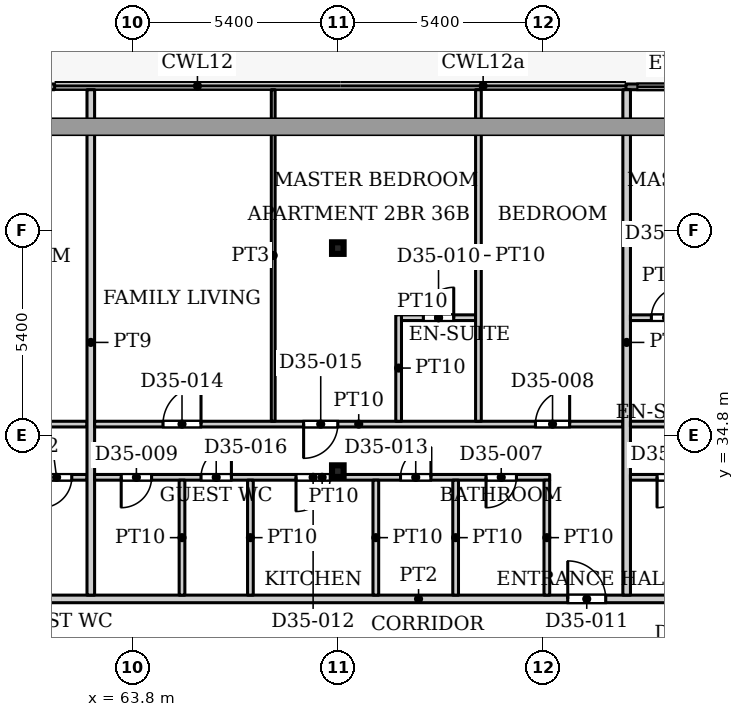
"""IFC4 building model, lengths in metres.
Left out: names, types, materials, properties, quantities, classifications, styles, units other than length and angle.
Written with IfcOpenShell. Run it as: python <this file> out.ifc"""

import sys

from ifc_helpers import new_model, si_unit, direction, frame, frame_2d, origin, origin_2d, place, context, subcontext, project, spatial, rectangle, hollow_rectangle, extrude, source, transform, mapped, element, fill, save


model = new_model("IFC4")
c1 = context("Model", 3, precision=1e-05, world=origin(), true_north=direction((0.0, 1.0)))
c2 = subcontext(c1, "Body", "Model", "MODEL_VIEW")
j1 = project(units=[si_unit("LENGTHUNIT", "METRE"), si_unit("PLANEANGLEUNIT", "RADIAN")], contexts=[c1])
p1 = place(None, origin())
s1 = spatial("IfcSite", under=j1, at=p1, CompositionType="ELEMENT")
p2 = place(p1, origin())
s2 = spatial("IfcBuilding", under=s1, at=p2, CompositionType="ELEMENT")
p3 = place(p2, frame((0.0, 0.0, 156.5)))
s3 = spatial("IfcBuildingStorey", under=s2, at=p3, CompositionType="ELEMENT", Elevation=156.5)
for number, where, z_axis, x_axis in (
    (1, (69.2, 33.863, 0.0), (0.0, 0.0, 1.0), (1.0, 0.0, 0.0)),
    (2, (69.2, 39.732, 0.0), (0.0, 0.0, 1.0), (1.0, 0.0, 0.0)),
):
    element("IfcColumn", number, at=place(p3, frame(where, z_axis=z_axis, x_axis=x_axis)), inside=s3, PredefinedType="COLUMN", context=c2, shape_type="SweptSolid", body=[
        extrude(hollow_rectangle(XDim=0.305, YDim=0.305, WallThickness=0.016, InnerFilletRadius=0.016, OuterFilletRadius=0.032, at=origin_2d()), origin(), (0.0, 0.0, 1.0), 3.9),
    ])
p4 = place(p3, frame((59.347, 43.975, 0.0), z_axis=(0.0, 0.0, 1.0), x_axis=(1.0, 0.0, 0.0)))
e3 = element("IfcWall", 3, at=p4, inside=s3, PredefinedType="SOLIDWALL", context=c2, shape_type="SweptSolid", body=[
    extrude(rectangle(XDim=2.401, YDim=0.15, at=frame_2d((1.201, 0.0))), origin(), (0.0, 0.0, 1.0), 3.75),
])
p5 = place(p4, frame((0.3, 0.0, 0.0)))
e4 = element("IfcOpeningElement", 4, at=p5, cuts=e3, PredefinedType="OPENING", context=c2, shape_type="SweptSolid", body=[
    extrude(rectangle(XDim=1.8, YDim=2.4, at=frame_2d((0.9, 1.2))), frame((0.0, 0.085, 0.0), z_axis=(0.0, -1.0, 0.0), x_axis=(1.0, 0.0, 0.0)), (0.0, 0.0, 1.0), 0.17),
])
p6 = place(p3, frame((76.782, 43.975, 0.0), z_axis=(0.0, 0.0, 1.0), x_axis=(1.0, 0.0, 0.0)))
e5 = element("IfcWall", 5, at=p6, inside=s3, PredefinedType="SOLIDWALL", context=c2, shape_type="SweptSolid", body=[
    extrude(rectangle(XDim=2.4, YDim=0.15, at=frame_2d((1.2, 0.0))), origin(), (0.0, 0.0, 1.0), 3.75),
])
p7 = place(p6, frame((0.3, 0.0, 0.0)))
e6 = element("IfcOpeningElement", 6, at=p7, cuts=e5, PredefinedType="OPENING", context=c2, shape_type="SweptSolid", body=[
    extrude(rectangle(XDim=1.8, YDim=2.4, at=frame_2d((0.9, 1.2))), frame((0.0, 0.085, 0.0), z_axis=(0.0, -1.0, 0.0), x_axis=(1.0, 0.0, 0.0)), (0.0, 0.0, 1.0), 0.17),
])
p8 = place(p3, frame((53.549, 30.5, 0.0), z_axis=(0.0, 0.0, 1.0), x_axis=(1.0, 0.0, 0.0)))
e7 = element("IfcWall", 7, at=p8, inside=s3, PredefinedType="PARTITIONING", context=c2, shape_type="SweptSolid", body=[
    extrude(rectangle(XDim=35.551, YDim=0.2, at=frame_2d((17.775, 0.0))), origin(), (0.0, 0.0, 1.0), 3.6),
])
p9 = place(p8, frame((0.251, 0.0, 0.0)))
e8 = element("IfcOpeningElement", 8, at=p9, cuts=e7, PredefinedType="OPENING", context=c2, shape_type="SweptSolid", body=[
    extrude(rectangle(XDim=1.0, YDim=2.1, at=frame_2d((0.5, 1.05))), frame((0.0, 0.11, 0.0), z_axis=(0.0, -1.0, 0.0), x_axis=(1.0, 0.0, 0.0)), (0.0, 0.0, 1.0), 0.22),
])
p10 = place(p8, frame((21.701, 0.0, 0.0)))
e9 = element("IfcOpeningElement", 9, at=p10, cuts=e7, PredefinedType="OPENING", context=c2, shape_type="SweptSolid", body=[
    extrude(rectangle(XDim=1.0, YDim=2.1, at=frame_2d((0.5, 1.05))), frame((0.0, 0.11, 0.0), z_axis=(0.0, -1.0, 0.0), x_axis=(1.0, 0.0, 0.0)), (0.0, 0.0, 1.0), 0.22),
])
p11 = place(p8, frame((32.201, 0.0, 0.0)))
e10 = element("IfcOpeningElement", 10, at=p11, cuts=e7, PredefinedType="OPENING", context=c2, shape_type="SweptSolid", body=[
    extrude(rectangle(XDim=1.0, YDim=2.1, at=frame_2d((0.5, 1.05))), frame((0.0, 0.11, 0.0), z_axis=(0.0, -1.0, 0.0), x_axis=(1.0, 0.0, 0.0)), (0.0, 0.0, 1.0), 0.22),
])
p12 = place(p3, frame((53.549, 35.1, 0.0), z_axis=(0.0, 0.0, 1.0), x_axis=(1.0, 0.0, 0.0)))
e11 = element("IfcWall", 11, at=p12, inside=s3, PredefinedType="PARTITIONING", context=c2, shape_type="SweptSolid", body=[
    extrude(rectangle(XDim=9.051, YDim=0.15, at=frame_2d((4.525, 0.0))), origin(), (0.0, 0.0, 1.0), 3.6),
])
p13 = place(p12, frame((6.751, 0.0, 0.0)))
e12 = element("IfcOpeningElement", 12, at=p13, cuts=e11, PredefinedType="OPENING", context=c2, shape_type="SweptSolid", body=[
    extrude(rectangle(XDim=0.9, YDim=2.1, at=frame_2d((0.45, 1.05))), frame((0.0, 0.085, 0.0), z_axis=(0.0, -1.0, 0.0), x_axis=(1.0, 0.0, 0.0)), (0.0, 0.0, 1.0), 0.17),
])
p14 = place(p12, frame((2.051, 0.0, 0.0)))
e13 = element("IfcOpeningElement", 13, at=p14, cuts=e11, PredefinedType="OPENING", context=c2, shape_type="SweptSolid", body=[
    extrude(rectangle(XDim=1.0, YDim=2.1, at=frame_2d((0.5, 1.05))), frame((0.0, 0.085, 0.0), z_axis=(0.0, -1.0, 0.0), x_axis=(1.0, 0.0, 0.0)), (0.0, 0.0, 1.0), 0.17),
])
p15 = place(p3, frame((55.125, 33.7, 0.0), z_axis=(0.0, 0.0, 1.0), x_axis=(1.0, 0.0, 0.0)))
e14 = element("IfcWall", 14, at=p15, inside=s3, PredefinedType="PARTITIONING", context=c2, shape_type="SweptSolid", body=[
    extrude(rectangle(XDim=7.475, YDim=0.15, at=frame_2d((3.738, 0.0))), origin(), (0.0, 0.0, 1.0), 3.6),
])
p16 = place(p15, frame((0.875, 0.0, 0.0)))
e15 = element("IfcOpeningElement", 15, at=p16, cuts=e14, PredefinedType="OPENING", context=c2, shape_type="SweptSolid", body=[
    extrude(rectangle(XDim=0.8, YDim=2.1, at=frame_2d((0.4, 1.05))), frame((0.0, 0.085, 0.0), z_axis=(0.0, -1.0, 0.0), x_axis=(1.0, 0.0, 0.0)), (0.0, 0.0, 1.0), 0.17),
])
p17 = place(p15, frame((3.675, 0.0, 0.0)))
e16 = element("IfcOpeningElement", 16, at=p17, cuts=e14, PredefinedType="OPENING", context=c2, shape_type="SweptSolid", body=[
    extrude(rectangle(XDim=0.9, YDim=2.1, at=frame_2d((0.45, 1.05))), frame((0.0, 0.085, 0.0), z_axis=(0.0, -1.0, 0.0), x_axis=(1.0, 0.0, 0.0)), (0.0, 0.0, 1.0), 0.17),
])
p18 = place(p15, frame((6.275, 0.0, 0.0)))
e17 = element("IfcOpeningElement", 17, at=p18, cuts=e14, PredefinedType="OPENING", context=c2, shape_type="SweptSolid", body=[
    extrude(rectangle(XDim=0.8, YDim=2.1, at=frame_2d((0.4, 1.05))), frame((0.0, 0.085, 0.0), z_axis=(0.0, -1.0, 0.0), x_axis=(1.0, 0.0, 0.0)), (0.0, 0.0, 1.0), 0.17),
])
p19 = place(p3, frame((62.7, 30.6, 0.0), z_axis=(0.0, 0.0, 1.0), x_axis=(0.0, 1.0, 0.0)))
e18 = element("IfcWall", 18, at=p19, inside=s3, PredefinedType="PARTITIONING", context=c2, shape_type="SweptSolid", body=[
    extrude(rectangle(XDim=13.3, YDim=0.2, at=frame_2d((6.65, 0.0))), origin(), (0.0, 0.0, 1.0), 3.6),
])
p20 = place(p3, frame((62.8, 33.7, 0.0), z_axis=(0.0, 0.0, 1.0), x_axis=(1.0, 0.0, 0.0)))
e19 = element("IfcWall", 19, at=p20, inside=s3, PredefinedType="PARTITIONING", context=c2, shape_type="SweptSolid", body=[
    extrude(rectangle(XDim=11.975, YDim=0.15, at=frame_2d((5.987, 0.0))), origin(), (0.0, 0.0, 1.0), 3.6),
])
p21 = place(p20, frame((10.3, 0.0, 0.0)))
e20 = element("IfcOpeningElement", 20, at=p21, cuts=e19, PredefinedType="OPENING", context=c2, shape_type="SweptSolid", body=[
    extrude(rectangle(XDim=0.8, YDim=2.1, at=frame_2d((0.4, 1.05))), frame((0.0, 0.085, 0.0), z_axis=(0.0, -1.0, 0.0), x_axis=(1.0, 0.0, 0.0)), (0.0, 0.0, 1.0), 0.17),
])
p22 = place(p20, frame((0.7, 0.0, 0.0)))
e21 = element("IfcOpeningElement", 21, at=p22, cuts=e19, PredefinedType="OPENING", context=c2, shape_type="SweptSolid", body=[
    extrude(rectangle(XDim=0.8, YDim=2.1, at=frame_2d((0.4, 1.05))), frame((0.0, 0.085, 0.0), z_axis=(0.0, -1.0, 0.0), x_axis=(1.0, 0.0, 0.0)), (0.0, 0.0, 1.0), 0.17),
])
p23 = place(p20, frame((5.3, 0.0, 0.0)))
e22 = element("IfcOpeningElement", 22, at=p23, cuts=e19, PredefinedType="OPENING", context=c2, shape_type="SweptSolid", body=[
    extrude(rectangle(XDim=0.9, YDim=2.1, at=frame_2d((0.45, 1.05))), frame((0.0, 0.085, 0.0), z_axis=(0.0, -1.0, 0.0), x_axis=(1.0, 0.0, 0.0)), (0.0, 0.0, 1.0), 0.17),
])
p24 = place(p20, frame((8.05, 0.0, 0.0)))
e23 = element("IfcOpeningElement", 23, at=p24, cuts=e19, PredefinedType="OPENING", context=c2, shape_type="SweptSolid", body=[
    extrude(rectangle(XDim=0.8, YDim=2.1, at=frame_2d((0.4, 1.05))), frame((0.0, 0.085, 0.0), z_axis=(0.0, -1.0, 0.0), x_axis=(1.0, 0.0, 0.0)), (0.0, 0.0, 1.0), 0.17),
])
p25 = place(p20, frame((2.8, 0.0, 0.0)))
e24 = element("IfcOpeningElement", 24, at=p25, cuts=e19, PredefinedType="OPENING", context=c2, shape_type="SweptSolid", body=[
    extrude(rectangle(XDim=0.8, YDim=2.1, at=frame_2d((0.4, 1.05))), frame((0.0, 0.085, 0.0), z_axis=(0.0, -1.0, 0.0), x_axis=(1.0, 0.0, 0.0)), (0.0, 0.0, 1.0), 0.17),
])
p26 = place(p3, frame((62.8, 35.1, 0.0), z_axis=(0.0, 0.0, 1.0), x_axis=(1.0, 0.0, 0.0)))
e25 = element("IfcWall", 25, at=p26, inside=s3, PredefinedType="PARTITIONING", context=c2, shape_type="SweptSolid", body=[
    extrude(rectangle(XDim=13.9, YDim=0.15, at=frame_2d((6.95, 0.0))), origin(), (0.0, 0.0, 1.0), 3.6),
])
p27 = place(p26, frame((11.6, 0.0, 0.0)))
e26 = element("IfcOpeningElement", 26, at=p27, cuts=e25, PredefinedType="OPENING", context=c2, shape_type="SweptSolid", body=[
    extrude(rectangle(XDim=0.9, YDim=2.1, at=frame_2d((0.45, 1.05))), frame((0.0, 0.085, 0.0), z_axis=(0.0, -1.0, 0.0), x_axis=(1.0, 0.0, 0.0)), (0.0, 0.0, 1.0), 0.17),
])
p28 = place(p26, frame((1.8, 0.0, 0.0)))
e27 = element("IfcOpeningElement", 27, at=p28, cuts=e25, PredefinedType="OPENING", context=c2, shape_type="SweptSolid", body=[
    extrude(rectangle(XDim=1.0, YDim=2.1, at=frame_2d((0.5, 1.05))), frame((0.0, 0.085, 0.0), z_axis=(0.0, -1.0, 0.0), x_axis=(1.0, 0.0, 0.0)), (0.0, 0.0, 1.0), 0.17),
])
p29 = place(p26, frame((5.5, 0.0, 0.0)))
e28 = element("IfcOpeningElement", 28, at=p29, cuts=e25, PredefinedType="OPENING", context=c2, shape_type="SweptSolid", body=[
    extrude(rectangle(XDim=0.9, YDim=2.1, at=frame_2d((0.45, 1.05))), frame((0.0, 0.085, 0.0), z_axis=(0.0, -1.0, 0.0), x_axis=(1.0, 0.0, 0.0)), (0.0, 0.0, 1.0), 0.17),
])
for number, where, z_axis, x_axis in (
    (29, (65.1, 30.6, 0.0), (0.0, 0.0, 1.0), (0.0, 1.0, 0.0)),
    (30, (66.9, 30.6, 0.0), (0.0, 0.0, 1.0), (0.0, 1.0, 0.0)),
):
    element("IfcWall", number, at=place(p3, frame(where, z_axis=z_axis, x_axis=x_axis)), inside=s3, PredefinedType="PARTITIONING", context=c2, shape_type="SweptSolid", body=[
        extrude(rectangle(XDim=3.025, YDim=0.15, at=frame_2d((1.512, 0.0))), origin(), (0.0, 0.0, 1.0), 3.6),
    ])
p30 = place(p3, frame((67.5, 35.175, 0.0), z_axis=(0.0, 0.0, 1.0), x_axis=(0.0, 1.0, 0.0)))
e31 = element("IfcWall", 31, at=p30, inside=s3, PredefinedType="PARTITIONING", context=c2, shape_type="SweptSolid", body=[
    extrude(rectangle(XDim=8.725, YDim=0.1, at=frame_2d((4.362, 0.0))), origin(), (0.0, 0.0, 1.0), 3.6),
])
p31 = place(p3, frame((70.2, 30.6, 0.0), z_axis=(0.0, 0.0, 1.0), x_axis=(0.0, 1.0, 0.0)))
e32 = element("IfcWall", 32, at=p31, inside=s3, PredefinedType="PARTITIONING", context=c2, shape_type="SweptSolid", body=[
    extrude(rectangle(XDim=3.025, YDim=0.15, at=frame_2d((1.512, 0.0))), origin(), (0.0, 0.0, 1.0), 3.6),
])
p32 = place(p3, frame((70.8, 35.175, 0.0), z_axis=(0.0, 0.0, 1.0), x_axis=(0.0, 1.0, 0.0)))
e33 = element("IfcWall", 33, at=p32, inside=s3, PredefinedType="PARTITIONING", context=c2, shape_type="SweptSolid", body=[
    extrude(rectangle(XDim=2.8, YDim=0.15, at=frame_2d((1.4, 0.0))), origin(), (0.0, 0.0, 1.0), 3.6),
])
p33 = place(p3, frame((70.875, 37.9, 0.0), z_axis=(0.0, 0.0, 1.0), x_axis=(1.0, 0.0, 0.0)))
e34 = element("IfcWall", 34, at=p33, inside=s3, PredefinedType="PARTITIONING", context=c2, shape_type="SweptSolid", body=[
    extrude(rectangle(XDim=1.95, YDim=0.15, at=frame_2d((0.975, 0.0))), origin(), (0.0, 0.0, 1.0), 3.6),
])
p34 = place(p33, frame((0.575, 0.0, 0.0)))
e35 = element("IfcOpeningElement", 35, at=p34, cuts=e34, PredefinedType="OPENING", context=c2, shape_type="SweptSolid", body=[
    extrude(rectangle(XDim=0.8, YDim=2.1, at=frame_2d((0.4, 1.05))), frame((0.0, 0.085, 0.0), z_axis=(0.0, -1.0, 0.0), x_axis=(1.0, 0.0, 0.0)), (0.0, 0.0, 1.0), 0.17),
])
p35 = place(p3, frame((72.3, 30.6, 0.0), z_axis=(0.0, 0.0, 1.0), x_axis=(0.0, 1.0, 0.0)))
e36 = element("IfcWall", 36, at=p35, inside=s3, PredefinedType="PARTITIONING", context=c2, shape_type="SweptSolid", body=[
    extrude(rectangle(XDim=3.025, YDim=0.15, at=frame_2d((1.512, 0.0))), origin(), (0.0, 0.0, 1.0), 3.6),
])
p36 = place(p3, frame((72.9, 35.175, 0.0), z_axis=(0.0, 0.0, 1.0), x_axis=(0.0, 1.0, 0.0)))
e37 = element("IfcWall", 37, at=p36, inside=s3, PredefinedType="PARTITIONING", context=c2, shape_type="SweptSolid", body=[
    extrude(rectangle(XDim=8.725, YDim=0.15, at=frame_2d((4.362, 0.0))), origin(), (0.0, 0.0, 1.0), 3.6),
])
p37 = place(p3, frame((74.7, 30.6, 0.0), z_axis=(0.0, 0.0, 1.0), x_axis=(0.0, 1.0, 0.0)))
e38 = element("IfcWall", 38, at=p37, inside=s3, PredefinedType="PARTITIONING", context=c2, shape_type="SweptSolid", body=[
    extrude(rectangle(XDim=3.025, YDim=0.15, at=frame_2d((1.512, 0.0))), origin(), (0.0, 0.0, 1.0), 3.6),
])
p38 = place(p3, frame((76.8, 30.6, 0.0), z_axis=(0.0, 0.0, 1.0), x_axis=(0.0, 1.0, 0.0)))
e39 = element("IfcWall", 39, at=p38, inside=s3, PredefinedType="PARTITIONING", context=c2, shape_type="SweptSolid", body=[
    extrude(rectangle(XDim=13.3, YDim=0.2, at=frame_2d((6.65, 0.0))), origin(), (0.0, 0.0, 1.0), 3.6),
])
p39 = place(p3, frame((76.9, 33.7, 0.0), z_axis=(0.0, 0.0, 1.0), x_axis=(1.0, 0.0, 0.0)))
e40 = element("IfcWall", 40, at=p39, inside=s3, PredefinedType="PARTITIONING", context=c2, shape_type="SweptSolid", body=[
    extrude(rectangle(XDim=8.375, YDim=0.15, at=frame_2d((4.188, 0.0))), origin(), (0.0, 0.0, 1.0), 3.6),
])
p40 = place(p39, frame((6.7, 0.0, 0.0)))
e41 = element("IfcOpeningElement", 41, at=p40, cuts=e40, PredefinedType="OPENING", context=c2, shape_type="SweptSolid", body=[
    extrude(rectangle(XDim=0.8, YDim=2.1, at=frame_2d((0.4, 1.05))), frame((0.0, 0.085, 0.0), z_axis=(0.0, -1.0, 0.0), x_axis=(1.0, 0.0, 0.0)), (0.0, 0.0, 1.0), 0.17),
])
p41 = place(p39, frame((0.7, 0.0, 0.0)))
e42 = element("IfcOpeningElement", 42, at=p41, cuts=e40, PredefinedType="OPENING", context=c2, shape_type="SweptSolid", body=[
    extrude(rectangle(XDim=0.8, YDim=2.1, at=frame_2d((0.4, 1.05))), frame((0.0, 0.085, 0.0), z_axis=(0.0, -1.0, 0.0), x_axis=(1.0, 0.0, 0.0)), (0.0, 0.0, 1.0), 0.17),
])
p42 = place(p39, frame((3.65, 0.0, 0.0)))
e43 = element("IfcOpeningElement", 43, at=p42, cuts=e40, PredefinedType="OPENING", context=c2, shape_type="SweptSolid", body=[
    extrude(rectangle(XDim=0.9, YDim=2.1, at=frame_2d((0.45, 1.05))), frame((0.0, 0.085, 0.0), z_axis=(0.0, -1.0, 0.0), x_axis=(1.0, 0.0, 0.0)), (0.0, 0.0, 1.0), 0.17),
])
p43 = place(p3, frame((76.9, 35.1, 0.0), z_axis=(0.0, 0.0, 1.0), x_axis=(1.0, 0.0, 0.0)))
e44 = element("IfcWall", 44, at=p43, inside=s3, PredefinedType="PARTITIONING", context=c2, shape_type="SweptSolid", body=[
    extrude(rectangle(XDim=12.2, YDim=0.15, at=frame_2d((6.1, 0.0))), origin(), (0.0, 0.0, 1.0), 3.6),
])
p44 = place(p43, frame((6.2, 0.0, 0.0)))
e45 = element("IfcOpeningElement", 45, at=p44, cuts=e44, PredefinedType="OPENING", context=c2, shape_type="SweptSolid", body=[
    extrude(rectangle(XDim=0.9, YDim=2.1, at=frame_2d((0.45, 1.05))), frame((0.0, 0.085, 0.0), z_axis=(0.0, -1.0, 0.0), x_axis=(1.0, 0.0, 0.0)), (0.0, 0.0, 1.0), 0.17),
])
p45 = place(p43, frame((9.6, 0.0, 0.0)))
e46 = element("IfcOpeningElement", 46, at=p45, cuts=e44, PredefinedType="OPENING", context=c2, shape_type="SweptSolid", body=[
    extrude(rectangle(XDim=1.0, YDim=2.1, at=frame_2d((0.5, 1.05))), frame((0.0, 0.085, 0.0), z_axis=(0.0, -1.0, 0.0), x_axis=(1.0, 0.0, 0.0)), (0.0, 0.0, 1.0), 0.17),
])
p46 = place(p43, frame((3.2, 0.0, 0.0)))
e47 = element("IfcOpeningElement", 47, at=p46, cuts=e44, PredefinedType="OPENING", context=c2, shape_type="SweptSolid", body=[
    extrude(rectangle(XDim=0.9, YDim=2.1, at=frame_2d((0.45, 1.05))), frame((0.0, 0.085, 0.0), z_axis=(0.0, -1.0, 0.0), x_axis=(1.0, 0.0, 0.0)), (0.0, 0.0, 1.0), 0.17),
])
p47 = place(p3, frame((76.9, 37.9, 0.0), z_axis=(0.0, 0.0, 1.0), x_axis=(1.0, 0.0, 0.0)))
e48 = element("IfcWall", 48, at=p47, inside=s3, PredefinedType="PARTITIONING", context=c2, shape_type="SweptSolid", body=[
    extrude(rectangle(XDim=1.925, YDim=0.15, at=frame_2d((0.962, 0.0))), origin(), (0.0, 0.0, 1.0), 3.6),
])
p48 = place(p47, frame((0.55, 0.0, 0.0)))
e49 = element("IfcOpeningElement", 49, at=p48, cuts=e48, PredefinedType="OPENING", context=c2, shape_type="SweptSolid", body=[
    extrude(rectangle(XDim=0.8, YDim=2.1, at=frame_2d((0.4, 1.05))), frame((0.0, 0.085, 0.0), z_axis=(0.0, -1.0, 0.0), x_axis=(1.0, 0.0, 0.0)), (0.0, 0.0, 1.0), 0.17),
])
m1 = source(origin(), c2, "Body", "SweptSolid", [
    extrude(rectangle(XDim=1.8, YDim=2.4, at=frame_2d((0.9, 1.2))), frame((0.0, 0.025, 0.0), z_axis=(0.0, -1.0, 0.0), x_axis=(1.0, 0.0, 0.0)), (0.0, 0.0, 1.0), 0.05),
])
p49 = place(p7, origin())
e50 = element("IfcDoor", 50, at=p49, inside=s3, OperationType="SLIDING_TO_LEFT", PredefinedType="DOOR", context=c2, shape_type="MappedRepresentation", body=[
    mapped(m1, transform((0.0, 0.0, 0.0), x_axis=(1.0, 0.0, 0.0), y_axis=(0.0, 1.0, 0.0), z_axis=(0.0, 0.0, 1.0), scale=1.0)),
])
fill(e6, e50)
m2 = source(origin(), c2, "Body", "SweptSolid", [
    extrude(rectangle(XDim=0.8, YDim=2.1, at=frame_2d((0.4, 1.05))), frame((0.0, 0.025, 0.0), z_axis=(0.0, -1.0, 0.0), x_axis=(1.0, 0.0, 0.0)), (0.0, 0.0, 1.0), 0.05),
])
p50 = place(p18, origin())
e51 = element("IfcDoor", 51, at=p50, inside=s3, OperationType="SINGLE_SWING_RIGHT", PredefinedType="DOOR", context=c2, shape_type="MappedRepresentation", body=[
    mapped(m2, transform((0.0, 0.0, 0.0), x_axis=(1.0, 0.0, 0.0), y_axis=(0.0, 1.0, 0.0), z_axis=(0.0, 0.0, 1.0), scale=1.0)),
])
fill(e17, e51)
p51 = place(p21, origin())
e52 = element("IfcDoor", 52, at=p51, inside=s3, OperationType="SINGLE_SWING_RIGHT", PredefinedType="DOOR", context=c2, shape_type="MappedRepresentation", body=[
    mapped(m2, transform((0.0, 0.0, 0.0), x_axis=(1.0, 0.0, 0.0), y_axis=(0.0, 1.0, 0.0), z_axis=(0.0, 0.0, 1.0), scale=1.0)),
])
fill(e20, e52)
m3 = source(origin(), c2, "Body", "SweptSolid", [
    extrude(rectangle(XDim=0.9, YDim=2.1, at=frame_2d((0.45, 1.05))), frame((0.0, 0.025, 0.0), z_axis=(0.0, -1.0, 0.0), x_axis=(1.0, 0.0, 0.0)), (0.0, 0.0, 1.0), 0.05),
])
p52 = place(p27, origin())
e53 = element("IfcDoor", 53, at=p52, inside=s3, OperationType="SINGLE_SWING_LEFT", PredefinedType="DOOR", context=c2, shape_type="MappedRepresentation", body=[
    mapped(m3, transform((0.0, 0.0, 0.0), x_axis=(1.0, 0.0, 0.0), y_axis=(0.0, 1.0, 0.0), z_axis=(0.0, 0.0, 1.0), scale=1.0)),
])
fill(e26, e53)
p53 = place(p22, origin())
e54 = element("IfcDoor", 54, at=p53, inside=s3, OperationType="SINGLE_SWING_RIGHT", PredefinedType="DOOR", context=c2, shape_type="MappedRepresentation", body=[
    mapped(m2, transform((0.0, 0.0, 0.0), x_axis=(1.0, 0.0, 0.0), y_axis=(0.0, 1.0, 0.0), z_axis=(0.0, 0.0, 1.0), scale=1.0)),
])
fill(e21, e54)
p54 = place(p34, origin())
e55 = element("IfcDoor", 55, at=p54, inside=s3, OperationType="SINGLE_SWING_LEFT", PredefinedType="DOOR", context=c2, shape_type="MappedRepresentation", body=[
    mapped(m2, transform((0.0, 0.0, 0.0), x_axis=(1.0, 0.0, 0.0), y_axis=(0.0, 1.0, 0.0), z_axis=(0.0, 0.0, 1.0), scale=1.0)),
])
fill(e35, e55)
m4 = source(origin(), c2, "Body", "SweptSolid", [
    extrude(rectangle(XDim=1.0, YDim=2.1, at=frame_2d((0.5, 1.05))), frame((0.0, 0.025, 0.0), z_axis=(0.0, -1.0, 0.0), x_axis=(1.0, 0.0, 0.0)), (0.0, 0.0, 1.0), 0.05),
])
p55 = place(p10, origin())
e56 = element("IfcDoor", 56, at=p55, inside=s3, OperationType="SINGLE_SWING_LEFT", PredefinedType="DOOR", context=c2, shape_type="MappedRepresentation", body=[
    mapped(m4, transform((0.0, 0.0, 0.0), x_axis=(1.0, 0.0, 0.0), y_axis=(0.0, 1.0, 0.0), z_axis=(0.0, 0.0, 1.0), scale=1.0)),
])
fill(e9, e56)
p56 = place(p23, origin())
e57 = element("IfcDoor", 57, at=p56, inside=s3, OperationType="SINGLE_SWING_RIGHT", PredefinedType="DOOR", context=c2, shape_type="MappedRepresentation", body=[
    mapped(m3, transform((0.0, 0.0, 0.0), x_axis=(1.0, 0.0, 0.0), y_axis=(0.0, 1.0, 0.0), z_axis=(0.0, 0.0, 1.0), scale=1.0)),
])
fill(e22, e57)
p57 = place(p24, origin())
e58 = element("IfcDoor", 58, at=p57, inside=s3, OperationType="SINGLE_SWING_LEFT", PredefinedType="DOOR", context=c2, shape_type="MappedRepresentation", body=[
    mapped(m2, transform((0.0, 0.0, 0.0), x_axis=(1.0, 0.0, 0.0), y_axis=(0.0, 1.0, 0.0), z_axis=(0.0, 0.0, 1.0), scale=1.0)),
])
fill(e23, e58)
m5 = source(origin(), c2, "Body", "SweptSolid", [
    extrude(rectangle(XDim=1.0, YDim=2.1, at=frame_2d((0.5, 1.05))), frame((0.0, 0.025, 0.0), z_axis=(0.0, -1.0, 0.0), x_axis=(1.0, 0.0, 0.0)), (0.0, 0.0, 1.0), 0.05),
])
p58 = place(p28, origin())
e59 = element("IfcDoor", 59, at=p58, inside=s3, OperationType="SINGLE_SWING_LEFT", PredefinedType="DOOR", context=c2, shape_type="MappedRepresentation", body=[
    mapped(m5, transform((0.0, 0.0, 0.0), x_axis=(1.0, 0.0, 0.0), y_axis=(0.0, 1.0, 0.0), z_axis=(0.0, 0.0, 1.0), scale=1.0)),
])
fill(e27, e59)
p59 = place(p29, origin())
e60 = element("IfcDoor", 60, at=p59, inside=s3, OperationType="SINGLE_SWING_RIGHT", PredefinedType="DOOR", context=c2, shape_type="MappedRepresentation", body=[
    mapped(m3, transform((0.0, 0.0, 0.0), x_axis=(1.0, 0.0, 0.0), y_axis=(0.0, 1.0, 0.0), z_axis=(0.0, 0.0, 1.0), scale=1.0)),
])
fill(e28, e60)
p60 = place(p25, origin())
e61 = element("IfcDoor", 61, at=p60, inside=s3, OperationType="SINGLE_SWING_LEFT", PredefinedType="DOOR", context=c2, shape_type="MappedRepresentation", body=[
    mapped(m2, transform((0.0, 0.0, 0.0), x_axis=(1.0, 0.0, 0.0), y_axis=(0.0, 1.0, 0.0), z_axis=(0.0, 0.0, 1.0), scale=1.0)),
])
fill(e24, e61)
p61 = place(p41, origin())
e62 = element("IfcDoor", 62, at=p61, inside=s3, OperationType="SINGLE_SWING_RIGHT", PredefinedType="DOOR", context=c2, shape_type="MappedRepresentation", body=[
    mapped(m2, transform((0.0, 0.0, 0.0), x_axis=(1.0, 0.0, 0.0), y_axis=(0.0, 1.0, 0.0), z_axis=(0.0, 0.0, 1.0), scale=1.0)),
])
fill(e42, e62)
p62 = place(p48, origin())
e63 = element("IfcDoor", 63, at=p62, inside=s3, OperationType="SINGLE_SWING_LEFT", PredefinedType="DOOR", context=c2, shape_type="MappedRepresentation", body=[
    mapped(m2, transform((0.0, 0.0, 0.0), x_axis=(1.0, 0.0, 0.0), y_axis=(0.0, 1.0, 0.0), z_axis=(0.0, 0.0, 1.0), scale=1.0)),
])
fill(e49, e63)
save(model, sys.argv[1])
